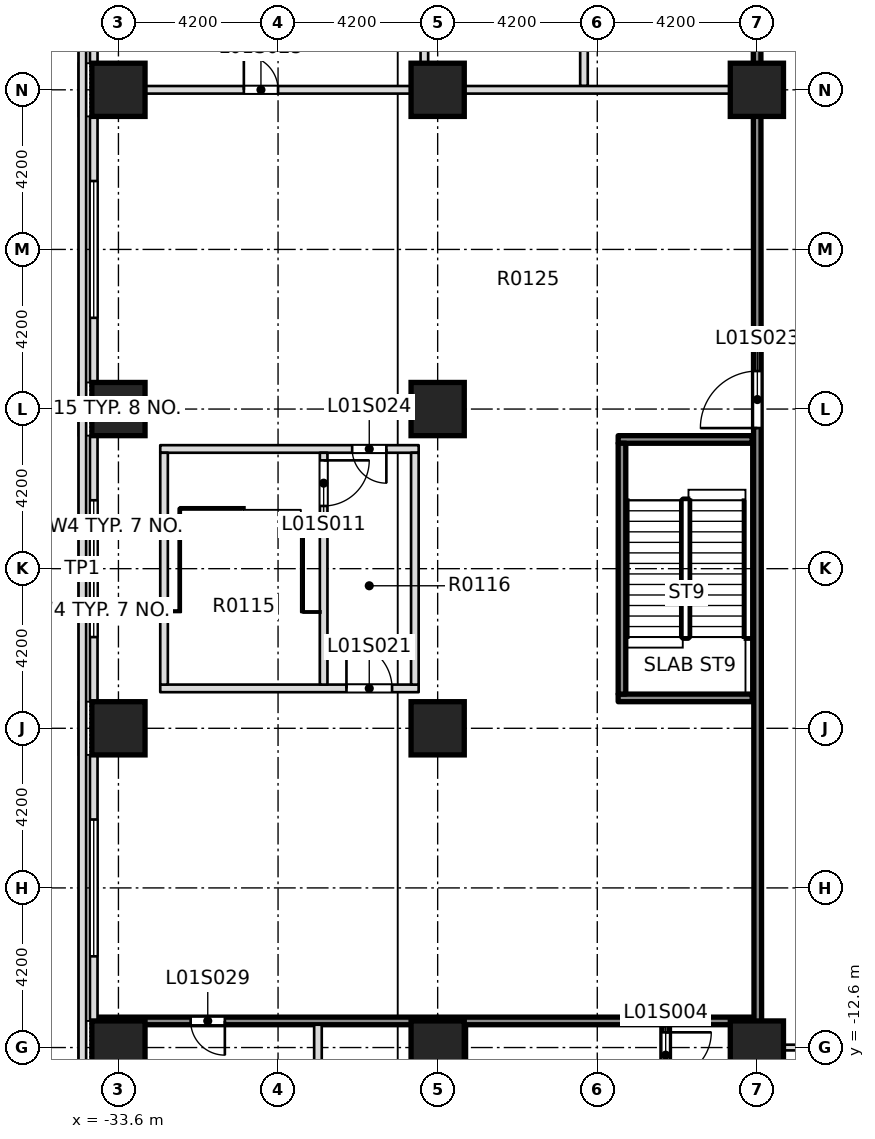
"""IFC4 building model, lengths in metres.
Left out: names, types, materials, properties, quantities, classifications, styles, units other than length and angle.
Written with IfcOpenShell. Run it as: python <this file> out.ifc"""

import sys

from ifc_helpers import new_model, si_unit, direction, frame, frame_2d, origin, origin_2d, place, context, subcontext, project, spatial, rectangle, extrude, element, fill, save


model = new_model("IFC4")
c1 = context("Model", 3, precision=1e-05, world=origin(), true_north=direction((0.0, 1.0)))
c2 = subcontext(c1, "Body", "Model", "MODEL_VIEW")
j1 = project(units=[si_unit("LENGTHUNIT", "METRE"), si_unit("PLANEANGLEUNIT", "RADIAN")], contexts=[c1])
p1 = place(None, origin())
s1 = spatial("IfcSite", under=j1, at=p1, CompositionType="ELEMENT")
p2 = place(p1, origin())
s2 = spatial("IfcBuilding", under=s1, at=p2, CompositionType="ELEMENT")
p3 = place(p2, frame((0.0, 0.0, 7.5)))
s3 = spatial("IfcBuildingStorey", under=s2, at=p3, CompositionType="ELEMENT", Elevation=7.5)
for number, where, z_axis, x_axis in (
    (1, (-25.2, -12.6, -0.4), (0.0, 0.0, 1.0), (1.0, 0.0, 0.0)),
    (2, (-16.8, -12.6, -0.4), (0.0, 0.0, 1.0), (1.0, 0.0, 0.0)),
    (3, (-25.2, -4.2, -0.4), (0.0, 0.0, 1.0), (1.0, 0.0, 0.0)),
    (4, (-25.2, 4.2, -0.4), (0.0, 0.0, 1.0), (1.0, 0.0, 0.0)),
    (5, (-25.2, 12.6, -0.4), (0.0, 0.0, 1.0), (1.0, 0.0, 0.0)),
    (6, (-16.8, 12.6, -0.4), (0.0, 0.0, 1.0), (1.0, 0.0, 0.0)),
):
    element("IfcColumn", number, at=place(p3, frame(where, z_axis=z_axis, x_axis=x_axis)), inside=s3, PredefinedType="COLUMN", context=c2, shape_type="SweptSolid", body=[
        extrude(rectangle(XDim=1.4, YDim=1.4, at=origin_2d()), origin(), (0.0, 0.0, 1.0), 5.0),
    ])
for number, where, z_axis, x_axis in (
    (7, (-33.6, -12.6, 0.0), (0.0, 0.0, 1.0), (1.0, 0.0, 0.0)),
    (8, (-33.6, -4.2, 0.0), (0.0, 0.0, 1.0), (1.0, 0.0, 0.0)),
    (9, (-33.6, 4.2, 0.0), (0.0, 0.0, 1.0), (1.0, 0.0, 0.0)),
    (10, (-33.6, 12.6, 0.0), (0.0, 0.0, 1.0), (1.0, 0.0, 0.0)),
):
    element("IfcColumn", number, at=place(p3, frame(where, z_axis=z_axis, x_axis=x_axis)), inside=s3, PredefinedType="COLUMN", context=c2, shape_type="SweptSolid", body=[
        extrude(rectangle(XDim=1.4, YDim=1.4, at=origin_2d()), origin(), (0.0, 0.0, 1.0), 4.6),
    ])
p4 = place(p3, frame((-34.55, -30.25, 5.0), z_axis=(0.0, 0.0, 1.0), x_axis=(0.0, 1.0, 0.0)))
e11 = element("IfcWall", 11, at=p4, inside=s3, PredefinedType="PARAPET", context=c2, shape_type="SweptSolid", body=[
    extrude(rectangle(XDim=60.5, YDim=0.2, at=frame_2d((30.25, 0.0))), origin(), (0.0, 0.0, 1.0), 1.2),
])
p5 = place(p3, frame((-16.9, -12.6, 0.0), z_axis=(0.0, 0.0, 1.0), x_axis=(1.0, 0.0, 0.0)))
e12 = element("IfcWall", 12, at=p5, inside=s3, PredefinedType="PARTITIONING", context=c2, shape_type="SweptSolid", body=[
    extrude(rectangle(XDim=9.625, YDim=0.15, at=frame_2d((4.812, 0.0))), origin(), (0.0, 0.0, 1.0), 4.6),
])
p6 = place(p3, frame((-25.2, -11.9, 0.0), z_axis=(0.0, 0.0, 1.0), x_axis=(1.0, 0.0, 0.0)))
e13 = element("IfcWall", 13, at=p6, inside=s3, PredefinedType="SOLIDWALL", context=c2, shape_type="SweptSolid", body=[
    extrude(rectangle(XDim=8.325, YDim=0.2, at=frame_2d((4.163, 0.0))), origin(), (0.0, 0.0, 1.0), 4.6),
])
p7 = place(p3, frame((-32.5, -3.15, 0.0), z_axis=(0.0, 0.0, 1.0), x_axis=(1.0, 0.0, 0.0)))
e14 = element("IfcWall", 14, at=p7, inside=s3, PredefinedType="PARTITIONING", context=c2, shape_type="SweptSolid", body=[
    extrude(rectangle(XDim=6.8, YDim=0.2, at=frame_2d((3.4, 0.0))), origin(), (0.0, 0.0, 1.0), 4.6),
])
p8 = place(p7, frame((4.9, 0.0, 0.0)))
e15 = element("IfcOpeningElement", 15, at=p8, cuts=e14, PredefinedType="OPENING", context=c2, shape_type="SweptSolid", body=[
    extrude(rectangle(XDim=1.2, YDim=2.1, at=frame_2d((0.6, 1.05))), frame((0.0, 0.11, 0.0), z_axis=(0.0, -1.0, 0.0), x_axis=(1.0, 0.0, 0.0)), (0.0, 0.0, 1.0), 0.22),
])
p9 = place(p3, frame((-32.5, 3.15, 0.0), z_axis=(0.0, 0.0, 1.0), x_axis=(1.0, 0.0, 0.0)))
e16 = element("IfcWall", 16, at=p9, inside=s3, PredefinedType="PARTITIONING", context=c2, shape_type="SweptSolid", body=[
    extrude(rectangle(XDim=6.8, YDim=0.2, at=frame_2d((3.4, 0.0))), origin(), (0.0, 0.0, 1.0), 4.6),
])
p10 = place(p9, frame((5.05, 0.0, 0.0)))
e17 = element("IfcOpeningElement", 17, at=p10, cuts=e16, PredefinedType="OPENING", context=c2, shape_type="SweptSolid", body=[
    extrude(rectangle(XDim=0.9, YDim=2.1, at=frame_2d((0.45, 1.05))), frame((0.0, 0.11, 0.0), z_axis=(0.0, -1.0, 0.0), x_axis=(1.0, 0.0, 0.0)), (0.0, 0.0, 1.0), 0.22),
])
p11 = place(p3, frame((-34.15, 12.6, 0.0), z_axis=(0.0, 0.0, 1.0), x_axis=(1.0, 0.0, 0.0)))
e18 = element("IfcWall", 18, at=p11, inside=s3, PredefinedType="PARTITIONING", context=c2, shape_type="SweptSolid", body=[
    extrude(rectangle(XDim=1.25, YDim=0.2, at=frame_2d((0.625, 0.0))), origin(), (0.0, 0.0, 1.0), 4.6),
])
p12 = place(p3, frame((-32.4, -3.05, 0.0), z_axis=(0.0, 0.0, 1.0), x_axis=(0.0, 1.0, 0.0)))
e19 = element("IfcWall", 19, at=p12, inside=s3, PredefinedType="PARTITIONING", context=c2, shape_type="SweptSolid", body=[
    extrude(rectangle(XDim=6.1, YDim=0.2, at=frame_2d((3.05, 0.0))), origin(), (0.0, 0.0, 1.0), 4.6),
])
p13 = place(p3, frame((-28.35, -18.125, 0.0), z_axis=(0.0, 0.0, 1.0), x_axis=(0.0, 1.0, 0.0)))
e20 = element("IfcWall", 20, at=p13, inside=s3, PredefinedType="PARTITIONING", context=c2, shape_type="SweptSolid", body=[
    extrude(rectangle(XDim=6.125, YDim=0.2, at=frame_2d((3.062, 0.0))), origin(), (0.0, 0.0, 1.0), 4.6),
])
p14 = place(p3, frame((-28.2, -3.05, 0.0), z_axis=(0.0, 0.0, 1.0), x_axis=(0.0, 1.0, 0.0)))
e21 = element("IfcWall", 21, at=p14, inside=s3, PredefinedType="PARTITIONING", context=c2, shape_type="SweptSolid", body=[
    extrude(rectangle(XDim=6.1, YDim=0.2, at=frame_2d((3.05, 0.0))), origin(), (0.0, 0.0, 1.0), 4.6),
])
p15 = place(p14, frame((4.7, 0.0, 0.0)))
e22 = element("IfcOpeningElement", 22, at=p15, cuts=e21, PredefinedType="OPENING", context=c2, shape_type="SweptSolid", body=[
    extrude(rectangle(XDim=1.2, YDim=2.1, at=frame_2d((0.6, 1.05))), frame((0.0, 0.11, 0.0), z_axis=(0.0, -1.0, 0.0), x_axis=(1.0, 0.0, 0.0)), (0.0, 0.0, 1.0), 0.22),
])
p16 = place(p3, frame((-25.8, -3.05, 0.0), z_axis=(0.0, 0.0, 1.0), x_axis=(0.0, 1.0, 0.0)))
e23 = element("IfcWall", 23, at=p16, inside=s3, PredefinedType="PARTITIONING", context=c2, shape_type="SweptSolid", body=[
    extrude(rectangle(XDim=6.1, YDim=0.2, at=frame_2d((3.05, 0.0))), origin(), (0.0, 0.0, 1.0), 4.6),
])
p17 = place(p3, frame((-25.55, 12.7, 0.0), z_axis=(0.0, 0.0, 1.0), x_axis=(0.0, 1.0, 0.0)))
e24 = element("IfcWall", 24, at=p17, inside=s3, PredefinedType="PARTITIONING", context=c2, shape_type="SweptSolid", body=[
    extrude(rectangle(XDim=8.975, YDim=0.2, at=frame_2d((4.488, 0.0))), origin(), (0.0, 0.0, 1.0), 4.6),
])
p18 = place(p3, frame((-25.2, -18.125, 0.0), z_axis=(0.0, 0.0, 1.0), x_axis=(0.0, 1.0, 0.0)))
e25 = element("IfcWall", 25, at=p18, inside=s3, PredefinedType="SOLIDWALL", context=c2, shape_type="SweptSolid", body=[
    extrude(rectangle(XDim=6.125, YDim=0.2, at=frame_2d((3.062, 0.0))), origin(), (0.0, 0.0, 1.0), 4.6),
])
p19 = place(p3, frame((-21.35, 12.7, 0.0), z_axis=(0.0, 0.0, 1.0), x_axis=(0.0, 1.0, 0.0)))
e26 = element("IfcWall", 26, at=p19, inside=s3, PredefinedType="PARTITIONING", context=c2, shape_type="SweptSolid", body=[
    extrude(rectangle(XDim=8.975, YDim=0.2, at=frame_2d((4.488, 0.0))), origin(), (0.0, 0.0, 1.0), 4.6),
])
p20 = place(p3, frame((-19.2, -18.125, 0.0), z_axis=(0.0, 0.0, 1.0), x_axis=(0.0, 1.0, 0.0)))
e27 = element("IfcWall", 27, at=p20, inside=s3, PredefinedType="SOLIDWALL", context=c2, shape_type="SweptSolid", body=[
    extrude(rectangle(XDim=6.125, YDim=0.2, at=frame_2d((3.062, 0.0))), origin(), (0.0, 0.0, 1.0), 4.6),
])
p21 = place(p20, frame((4.725, 0.0, 0.0)))
e28 = element("IfcOpeningElement", 28, at=p21, cuts=e27, PredefinedType="OPENING", context=c2, shape_type="SweptSolid", body=[
    extrude(rectangle(XDim=1.2, YDim=2.1, at=frame_2d((0.6, 1.05))), frame((0.0, 0.11, 0.0), z_axis=(0.0, -1.0, 0.0), x_axis=(1.0, 0.0, 0.0)), (0.0, 0.0, 1.0), 0.22),
])
p22 = place(p3, frame((-16.8, -18.125, 0.0), z_axis=(0.0, 0.0, 1.0), x_axis=(0.0, 1.0, 0.0)))
e29 = element("IfcWall", 29, at=p22, inside=s3, PredefinedType="PARTITIONING", context=c2, shape_type="SweptSolid", body=[
    extrude(rectangle(XDim=5.45, YDim=0.2, at=frame_2d((2.725, 0.0))), origin(), (0.0, 0.0, 1.0), 4.6),
])
p23 = place(p3, frame((-16.775, -12.525, 0.0), z_axis=(0.0, 0.0, 1.0), x_axis=(-0.000727609751, 0.999999735292, 0.0)))
e30 = element("IfcWall", 30, at=p23, inside=s3, PredefinedType="SOLIDWALL", context=c2, shape_type="SweptSolid", body=[
    extrude(rectangle(XDim=34.225, YDim=0.2, at=frame_2d((17.112, 0.0))), origin(), (0.0, 0.0, 1.0), 4.6),
])
p24 = place(p23, frame((16.225, 0.0, 0.0)))
e31 = element("IfcOpeningElement", 31, at=p24, cuts=e30, PredefinedType="OPENING", context=c2, shape_type="SweptSolid", body=[
    extrude(rectangle(XDim=1.5, YDim=2.1, at=frame_2d((0.75, 1.05))), frame((0.0, 0.11, 0.0), z_axis=(0.0, -1.0, 0.0), x_axis=(1.0, 0.0, 0.0)), (0.0, 0.0, 1.0), 0.22),
])
p25 = place(p3, frame((-34.25, 20.3, 0.0), z_axis=(0.0, 0.0, 1.0), x_axis=(0.0, -1.0, 0.0)))
e32 = element("IfcWall", 32, at=p25, inside=s3, PredefinedType="STANDARD", context=c2, shape_type="SweptSolid", body=[
    extrude(rectangle(XDim=7.0, YDim=0.2, at=frame_2d((3.5, 0.0))), origin(), (0.0, 0.0, 1.0), 4.6),
])
p26 = place(p25, frame((1.7, 0.0, 0.9)))
e33 = element("IfcOpeningElement", 33, at=p26, cuts=e32, PredefinedType="OPENING", context=c2, shape_type="SweptSolid", body=[
    extrude(rectangle(XDim=3.6, YDim=2.8, at=frame_2d((1.8, 1.4))), frame((0.0, 0.11, 0.0), z_axis=(0.0, -1.0, 0.0), x_axis=(1.0, 0.0, 0.0)), (0.0, 0.0, 1.0), 0.22),
])
p27 = place(p3, frame((-34.25, 11.9, 0.0), z_axis=(0.0, 0.0, 1.0), x_axis=(0.0, -1.0, 0.0)))
e34 = element("IfcWall", 34, at=p27, inside=s3, PredefinedType="STANDARD", context=c2, shape_type="SweptSolid", body=[
    extrude(rectangle(XDim=7.0, YDim=0.2, at=frame_2d((3.5, 0.0))), origin(), (0.0, 0.0, 1.0), 4.6),
])
p28 = place(p27, frame((1.7, 0.0, 0.9)))
e35 = element("IfcOpeningElement", 35, at=p28, cuts=e34, PredefinedType="OPENING", context=c2, shape_type="SweptSolid", body=[
    extrude(rectangle(XDim=3.6, YDim=2.8, at=frame_2d((1.8, 1.4))), frame((0.0, 0.11, 0.0), z_axis=(0.0, -1.0, 0.0), x_axis=(1.0, 0.0, 0.0)), (0.0, 0.0, 1.0), 0.22),
])
p29 = place(p3, frame((-34.25, 3.5, 0.0), z_axis=(0.0, 0.0, 1.0), x_axis=(0.0, -1.0, 0.0)))
e36 = element("IfcWall", 36, at=p29, inside=s3, PredefinedType="STANDARD", context=c2, shape_type="SweptSolid", body=[
    extrude(rectangle(XDim=7.0, YDim=0.2, at=frame_2d((3.5, 0.0))), origin(), (0.0, 0.0, 1.0), 4.6),
])
p30 = place(p29, frame((1.7, 0.0, 0.9)))
e37 = element("IfcOpeningElement", 37, at=p30, cuts=e36, PredefinedType="OPENING", context=c2, shape_type="SweptSolid", body=[
    extrude(rectangle(XDim=3.6, YDim=2.8, at=frame_2d((1.8, 1.4))), frame((0.0, 0.11, 0.0), z_axis=(0.0, -1.0, 0.0), x_axis=(1.0, 0.0, 0.0)), (0.0, 0.0, 1.0), 0.22),
])
p31 = place(p3, frame((-34.25, -4.9, 0.0), z_axis=(0.0, 0.0, 1.0), x_axis=(0.0, -1.0, 0.0)))
e38 = element("IfcWall", 38, at=p31, inside=s3, PredefinedType="STANDARD", context=c2, shape_type="SweptSolid", body=[
    extrude(rectangle(XDim=7.0, YDim=0.2, at=frame_2d((3.5, 0.0))), origin(), (0.0, 0.0, 1.0), 4.6),
])
p32 = place(p31, frame((1.7, 0.0, 0.9)))
e39 = element("IfcOpeningElement", 39, at=p32, cuts=e38, PredefinedType="OPENING", context=c2, shape_type="SweptSolid", body=[
    extrude(rectangle(XDim=3.6, YDim=2.8, at=frame_2d((1.8, 1.4))), frame((0.0, 0.11, 0.0), z_axis=(0.0, -1.0, 0.0), x_axis=(1.0, 0.0, 0.0)), (0.0, 0.0, 1.0), 0.22),
])
for number, where, z_axis, x_axis in (
    (40, (-20.45, -3.4, 0.0), (0.0, 0.0, 1.0), (1.0, 0.0, 0.0)),
    (41, (-20.45, 3.4, 0.0), (0.0, 0.0, 1.0), (1.0, 0.0, 0.0)),
):
    element("IfcWall", number, at=place(p3, frame(where, z_axis=z_axis, x_axis=x_axis)), inside=s3, PredefinedType="SOLIDWALL", context=c2, shape_type="SweptSolid", body=[
        extrude(rectangle(XDim=3.525, YDim=0.2, at=frame_2d((1.762, 0.0))), origin(), (0.0, 0.0, 1.0), 4.6),
    ])
p33 = place(p3, frame((-20.35, -3.3, 0.0), z_axis=(0.0, 0.0, 1.0), x_axis=(0.0, 1.0, 0.0)))
e42 = element("IfcWall", 42, at=p33, inside=s3, PredefinedType="SOLIDWALL", context=c2, shape_type="SweptSolid", body=[
    extrude(rectangle(XDim=6.6, YDim=0.2, at=frame_2d((3.3, 0.0))), origin(), (0.0, 0.0, 1.0), 4.6),
])
p34 = place(p3, frame((-34.15, -11.9, 0.0), z_axis=(0.0, 0.0, 1.0), x_axis=(1.0, 0.0, 0.0)))
e43 = element("IfcWall", 43, at=p34, inside=s3, PredefinedType="SOLIDWALL", context=c2, shape_type="SweptSolid", body=[
    extrude(rectangle(XDim=8.95, YDim=0.2, at=frame_2d((4.475, 0.0))), origin(), (0.0, 0.0, 1.0), 4.6),
])
p35 = place(p34, frame((2.45, 0.0, 0.0)))
e44 = element("IfcOpeningElement", 44, at=p35, cuts=e43, PredefinedType="OPENING", context=c2, shape_type="SweptSolid", body=[
    extrude(rectangle(XDim=0.9, YDim=2.1, at=frame_2d((0.45, 1.05))), frame((0.0, 0.11, 0.0), z_axis=(0.0, -1.0, 0.0), x_axis=(1.0, 0.0, 0.0)), (0.0, 0.0, 1.0), 0.22),
])
p36 = place(p3, frame((-32.9, 12.6, 0.0), z_axis=(0.0, 0.0, 1.0), x_axis=(1.0, 0.0, 0.0)))
e45 = element("IfcWall", 45, at=p36, inside=s3, PredefinedType="PARTITIONING", context=c2, shape_type="SweptSolid", body=[
    extrude(rectangle(XDim=7.0, YDim=0.2, at=frame_2d((3.5, 0.0))), origin(), (0.0, 0.0, 1.0), 3.8),
])
p37 = place(p36, frame((2.6, 0.0, 0.0)))
e46 = element("IfcOpeningElement", 46, at=p37, cuts=e45, PredefinedType="OPENING", context=c2, shape_type="SweptSolid", body=[
    extrude(rectangle(XDim=0.9, YDim=2.1, at=frame_2d((0.45, 1.05))), frame((0.0, 0.11, 0.0), z_axis=(0.0, -1.0, 0.0), x_axis=(1.0, 0.0, 0.0)), (0.0, 0.0, 1.0), 0.22),
])
p38 = place(p3, frame((-25.9, 12.6, 0.0), z_axis=(0.0, 0.0, 1.0), x_axis=(1.0, 0.0, 0.0)))
e47 = element("IfcWall", 47, at=p38, inside=s3, PredefinedType="PARTITIONING", context=c2, shape_type="SweptSolid", body=[
    extrude(rectangle(XDim=9.025, YDim=0.2, at=frame_2d((4.512, 0.0))), origin(), (0.0, 0.0, 1.0), 4.6),
])
p39 = place(p21, origin())
e48 = element("IfcDoor", 48, at=p39, inside=s3, OperationType="DOUBLE_DOOR_SINGLE_SWING", PredefinedType="DOOR", context=c2, shape_type="SweptSolid", body=[
    extrude(rectangle(XDim=1.2, YDim=2.1, at=frame_2d((0.6, 1.05))), frame((0.0, 0.025, 0.0), z_axis=(0.0, -1.0, 0.0), x_axis=(1.0, 0.0, 0.0)), (0.0, 0.0, 1.0), 0.05),
])
fill(e28, e48)
p40 = place(p15, origin())
e49 = element("IfcDoor", 49, at=p40, inside=s3, OperationType="DOUBLE_DOOR_SINGLE_SWING", PredefinedType="DOOR", context=c2, shape_type="SweptSolid", body=[
    extrude(rectangle(XDim=1.2, YDim=2.1, at=frame_2d((0.6, 1.05))), frame((0.0, 0.025, 0.0), z_axis=(0.0, -1.0, 0.0), x_axis=(1.0, 0.0, 0.0)), (0.0, 0.0, 1.0), 0.05),
])
fill(e22, e49)
p41 = place(p8, origin())
e50 = element("IfcDoor", 50, at=p41, inside=s3, OperationType="SINGLE_SWING_LEFT", PredefinedType="DOOR", context=c2, shape_type="SweptSolid", body=[
    extrude(rectangle(XDim=1.2, YDim=2.1, at=frame_2d((0.6, 1.05))), frame((0.0, 0.025, 0.0), z_axis=(0.0, -1.0, 0.0), x_axis=(1.0, 0.0, 0.0)), (0.0, 0.0, 1.0), 0.05),
])
fill(e15, e50)
p42 = place(p24, origin())
e51 = element("IfcDoor", 51, at=p42, inside=s3, OperationType="DOUBLE_DOOR_SINGLE_SWING", PredefinedType="DOOR", context=c2, shape_type="SweptSolid", body=[
    extrude(rectangle(XDim=1.5, YDim=2.1, at=frame_2d((0.75, 1.05))), frame((0.0, 0.025, 0.0), z_axis=(0.0, -1.0, 0.0), x_axis=(1.0, 0.0, 0.0)), (0.0, 0.0, 1.0), 0.05),
])
fill(e31, e51)
p43 = place(p10, origin())
e52 = element("IfcDoor", 52, at=p43, inside=s3, OperationType="SINGLE_SWING_LEFT", PredefinedType="DOOR", context=c2, shape_type="SweptSolid", body=[
    extrude(rectangle(XDim=0.9, YDim=2.1, at=frame_2d((0.45, 1.05))), frame((0.0, 0.025, 0.0), z_axis=(0.0, -1.0, 0.0), x_axis=(1.0, 0.0, 0.0)), (0.0, 0.0, 1.0), 0.05),
])
fill(e17, e52)
p44 = place(p37, origin())
e53 = element("IfcDoor", 53, at=p44, inside=s3, OperationType="SINGLE_SWING_LEFT", PredefinedType="DOOR", context=c2, shape_type="SweptSolid", body=[
    extrude(rectangle(XDim=0.9, YDim=2.1, at=frame_2d((0.45, 1.05))), frame((0.0, 0.025, 0.0), z_axis=(0.0, -1.0, 0.0), x_axis=(1.0, 0.0, 0.0)), (0.0, 0.0, 1.0), 0.05),
])
fill(e46, e53)
p45 = place(p35, origin())
e54 = element("IfcDoor", 54, at=p45, inside=s3, OperationType="SINGLE_SWING_LEFT", PredefinedType="DOOR", context=c2, shape_type="SweptSolid", body=[
    extrude(rectangle(XDim=0.9, YDim=2.1, at=frame_2d((0.45, 1.05))), frame((0.0, 0.025, 0.0), z_axis=(0.0, -1.0, 0.0), x_axis=(1.0, 0.0, 0.0)), (0.0, 0.0, 1.0), 0.05),
])
fill(e44, e54)
p46 = place(p28, origin())
e55 = element("IfcWindow", 55, at=p46, inside=s3, PartitioningType="SINGLE_PANEL", PredefinedType="WINDOW", context=c2, shape_type="SweptSolid", body=[
    extrude(rectangle(XDim=3.6, YDim=2.8, at=frame_2d((1.8, 1.4))), frame((0.0, 0.03, 0.0), z_axis=(0.0, -1.0, 0.0), x_axis=(1.0, 0.0, 0.0)), (0.0, 0.0, 1.0), 0.06),
])
fill(e35, e55)
p47 = place(p30, origin())
e56 = element("IfcWindow", 56, at=p47, inside=s3, PartitioningType="SINGLE_PANEL", PredefinedType="WINDOW", context=c2, shape_type="SweptSolid", body=[
    extrude(rectangle(XDim=3.6, YDim=2.8, at=frame_2d((1.8, 1.4))), frame((0.0, 0.03, 0.0), z_axis=(0.0, -1.0, 0.0), x_axis=(1.0, 0.0, 0.0)), (0.0, 0.0, 1.0), 0.06),
])
fill(e37, e56)
p48 = place(p32, origin())
e57 = element("IfcWindow", 57, at=p48, inside=s3, PartitioningType="SINGLE_PANEL", PredefinedType="WINDOW", context=c2, shape_type="SweptSolid", body=[
    extrude(rectangle(XDim=3.6, YDim=2.8, at=frame_2d((1.8, 1.4))), frame((0.0, 0.03, 0.0), z_axis=(0.0, -1.0, 0.0), x_axis=(1.0, 0.0, 0.0)), (0.0, 0.0, 1.0), 0.06),
])
fill(e39, e57)
save(model, sys.argv[1])
